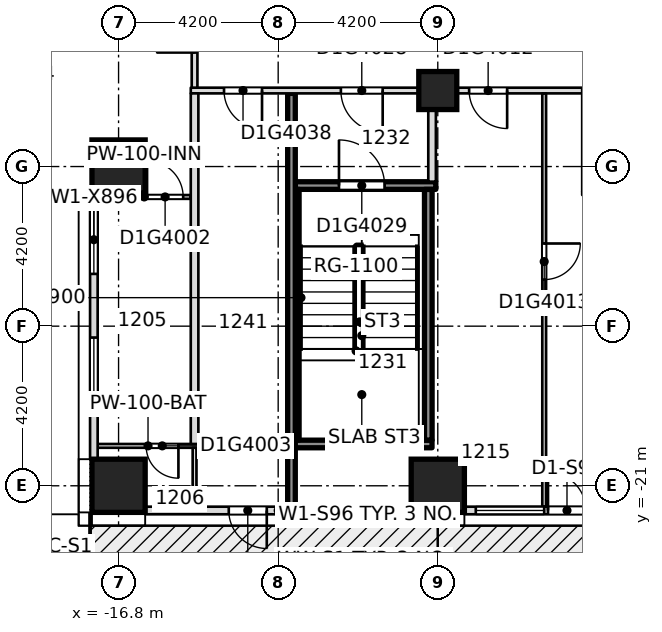
"""IFC4 building model, lengths in metres.
Left out: names, types, materials, properties, quantities, classifications, styles, units other than length and angle.
Written with IfcOpenShell. Run it as: python <this file> out.ifc"""

import sys

from ifc_helpers import new_model, si_unit, direction, frame, frame_2d, origin, origin_2d, place, context, subcontext, project, spatial, rectangle, extrude, element, fill, save


model = new_model("IFC4")
c1 = context("Model", 3, precision=1e-05, world=origin(), true_north=direction((0.0, 1.0)))
c2 = subcontext(c1, "Body", "Model", "MODEL_VIEW")
j1 = project(units=[si_unit("LENGTHUNIT", "METRE"), si_unit("PLANEANGLEUNIT", "RADIAN")], contexts=[c1])
p1 = place(None, origin())
s1 = spatial("IfcSite", under=j1, at=p1, CompositionType="ELEMENT")
p2 = place(p1, origin())
s2 = spatial("IfcBuilding", under=s1, at=p2, CompositionType="ELEMENT")
p3 = place(p2, frame((0.0, 0.0, 55.2)))
s3 = spatial("IfcBuildingStorey", under=s2, at=p3, CompositionType="ELEMENT", Elevation=55.2)
for number, where, z_axis, x_axis in (
    (1, (-16.8, -21.0, -0.32), (0.0, 0.0, 1.0), (1.0, 0.0, 0.0)),
    (2, (-8.4, -21.0, -0.32), (0.0, 0.0, 1.0), (1.0, 0.0, 0.0)),
    (3, (-16.8, -12.6, -0.32), (0.0, 0.0, 1.0), (1.0, 0.0, 0.0)),
):
    element("IfcColumn", number, at=place(p3, frame(where, z_axis=z_axis, x_axis=x_axis)), inside=s3, PredefinedType="COLUMN", context=c2, shape_type="SweptSolid", body=[
        extrude(rectangle(XDim=1.4, YDim=1.4, at=origin_2d()), origin(), (0.0, 0.0, 1.0), 3.45),
    ])
p4 = place(p3, frame((-8.4, -10.6, -0.32), z_axis=(0.0, 0.0, 1.0), x_axis=(1.0, 0.0, 0.0)))
e4 = element("IfcColumn", 4, at=p4, inside=s3, PredefinedType="COLUMN", context=c2, shape_type="SweptSolid", body=[
    extrude(rectangle(XDim=1.0, YDim=1.0, at=origin_2d()), origin(), (0.0, 0.0, 1.0), 3.45),
])
p5 = place(p3, frame((-17.35, -19.95, 0.0), z_axis=(0.0, 0.0, 1.0), x_axis=(1.0, 0.0, 0.0)))
e5 = element("IfcWall", 5, at=p5, inside=s3, PredefinedType="PARTITIONING", context=c2, shape_type="SweptSolid", body=[
    extrude(rectangle(XDim=2.65, YDim=0.1, at=frame_2d((1.325, 0.0))), origin(), (0.0, 0.0, 1.0), 3.13),
])
p6 = place(p5, frame((1.275, 0.0, 0.0)))
e6 = element("IfcOpeningElement", 6, at=p6, cuts=e5, PredefinedType="OPENING", context=c2, shape_type="SweptSolid", body=[
    extrude(rectangle(XDim=0.85, YDim=2.1, at=frame_2d((0.425, 1.05))), frame((0.0, 0.06, 0.0), z_axis=(0.0, -1.0, 0.0), x_axis=(1.0, 0.0, 0.0)), (0.0, 0.0, 1.0), 0.12),
])
p7 = place(p3, frame((-12.248, -19.9, 0.0), z_axis=(0.0, 0.0, 1.0), x_axis=(1.0, 0.0, 0.0)))
e7 = element("IfcWall", 7, at=p7, inside=s3, PredefinedType="SOLIDWALL", context=c2, shape_type="SweptSolid", body=[
    extrude(rectangle(XDim=3.696, YDim=0.2, at=frame_2d((1.848, 0.0))), origin(), (0.0, 0.0, 1.0), 3.13),
])
p8 = place(p3, frame((-17.35, -13.4, 0.0), z_axis=(0.0, 0.0, 1.0), x_axis=(1.0, 0.0, 0.0)))
e8 = element("IfcWall", 8, at=p8, inside=s3, PredefinedType="PARTITIONING", context=c2, shape_type="SweptSolid", body=[
    extrude(rectangle(XDim=2.45, YDim=0.1, at=frame_2d((1.225, 0.0))), origin(), (0.0, 0.0, 1.0), 3.13),
])
p9 = place(p8, frame((1.3, 0.0, 0.0)))
e9 = element("IfcOpeningElement", 9, at=p9, cuts=e8, PredefinedType="OPENING", context=c2, shape_type="SweptSolid", body=[
    extrude(rectangle(XDim=0.95, YDim=2.1, at=frame_2d((0.475, 1.05))), frame((0.0, 0.06, 0.0), z_axis=(0.0, -1.0, 0.0), x_axis=(1.0, 0.0, 0.0)), (0.0, 0.0, 1.0), 0.12),
])
p10 = place(p3, frame((-12.148, -13.1, 0.0), z_axis=(0.0, 0.0, 1.0), x_axis=(1.0, 0.0, 0.0)))
e10 = element("IfcWall", 10, at=p10, inside=s3, PredefinedType="SOLIDWALL", context=c2, shape_type="SweptSolid", body=[
    extrude(rectangle(XDim=3.696, YDim=0.2, at=frame_2d((1.848, 0.0))), origin(), (0.0, 0.0, 1.0), 3.13),
])
p11 = place(p10, frame((1.148, 0.0, 0.0)))
e11 = element("IfcOpeningElement", 11, at=p11, cuts=e10, PredefinedType="OPENING", context=c2, shape_type="SweptSolid", body=[
    extrude(rectangle(XDim=1.2, YDim=2.1, at=frame_2d((0.6, 1.05))), frame((0.0, 0.11, 0.0), z_axis=(0.0, -1.0, 0.0), x_axis=(1.0, 0.0, 0.0)), (0.0, 0.0, 1.0), 0.22),
])
p12 = place(p3, frame((-14.9, -10.6, 0.0), z_axis=(0.0, 0.0, 1.0), x_axis=(1.0, 0.0, 0.0)))
e12 = element("IfcWall", 12, at=p12, inside=s3, PredefinedType="PARTITIONING", context=c2, shape_type="SweptSolid", body=[
    extrude(rectangle(XDim=10.4, YDim=0.15, at=frame_2d((5.2, 0.0))), origin(), (0.0, 0.0, 1.0), 3.13),
])
p13 = place(p12, frame((7.325, 0.0, 0.0)))
e13 = element("IfcOpeningElement", 13, at=p13, cuts=e12, PredefinedType="OPENING", context=c2, shape_type="SweptSolid", body=[
    extrude(rectangle(XDim=1.0, YDim=2.1, at=frame_2d((0.5, 1.05))), frame((0.0, 0.085, 0.0), z_axis=(0.0, -1.0, 0.0), x_axis=(1.0, 0.0, 0.0)), (0.0, 0.0, 1.0), 0.17),
])
p14 = place(p12, frame((3.95, 0.0, 0.0)))
e14 = element("IfcOpeningElement", 14, at=p14, cuts=e12, PredefinedType="OPENING", context=c2, shape_type="SweptSolid", body=[
    extrude(rectangle(XDim=1.1, YDim=2.1, at=frame_2d((0.55, 1.05))), frame((0.0, 0.085, 0.0), z_axis=(0.0, -1.0, 0.0), x_axis=(1.0, 0.0, 0.0)), (0.0, 0.0, 1.0), 0.17),
])
p15 = place(p12, frame((0.875, 0.0, 0.0)))
e15 = element("IfcOpeningElement", 15, at=p15, cuts=e12, PredefinedType="OPENING", context=c2, shape_type="SweptSolid", body=[
    extrude(rectangle(XDim=1.0, YDim=2.1, at=frame_2d((0.5, 1.05))), frame((0.0, 0.085, 0.0), z_axis=(0.0, -1.0, 0.0), x_axis=(1.0, 0.0, 0.0)), (0.0, 0.0, 1.0), 0.17),
])
p16 = place(p3, frame((-4.6, -10.6, 0.0), z_axis=(0.0, 0.0, 1.0), x_axis=(1.0, 0.0, 0.0)))
e16 = element("IfcWall", 16, at=p16, inside=s3, PredefinedType="PARTITIONING", context=c2, shape_type="SweptSolid", body=[
    extrude(rectangle(XDim=2.8, YDim=0.1, at=frame_2d((1.4, 0.0))), origin(), (0.0, 0.0, 1.0), 3.13),
])
p17 = place(p3, frame((-14.8, -21.55, 0.0), z_axis=(0.0, 0.0, 1.0), x_axis=(0.0, 1.0, 0.0)))
e17 = element("IfcWall", 17, at=p17, inside=s3, PredefinedType="PARTITIONING", context=c2, shape_type="SweptSolid", body=[
    extrude(rectangle(XDim=1.55, YDim=0.1, at=frame_2d((0.775, 0.0))), origin(), (0.0, 0.0, 1.0), 3.13),
])
p18 = place(p3, frame((-14.8, -19.9, 0.0), z_axis=(0.0, 0.0, 1.0), x_axis=(0.0, 1.0, 0.0)))
e18 = element("IfcWall", 18, at=p18, inside=s3, PredefinedType="PARTITIONING", context=c2, shape_type="SweptSolid", body=[
    extrude(rectangle(XDim=9.225, YDim=0.2, at=frame_2d((4.612, 0.0))), origin(), (0.0, 0.0, 1.0), 3.13),
])
p19 = place(p3, frame((-14.8, -10.525, 0.0), z_axis=(0.0, 0.0, 1.0), x_axis=(0.0, 1.0, 0.0)))
e19 = element("IfcWall", 19, at=p19, inside=s3, PredefinedType="PARTITIONING", context=c2, shape_type="SweptSolid", body=[
    extrude(rectangle(XDim=18.535, YDim=0.15, at=frame_2d((9.268, 0.0))), origin(), (0.0, 0.0, 1.0), 3.13),
])
p20 = place(p19, frame((0.925, 0.0, 0.0)))
e20 = element("IfcOpeningElement", 20, at=p20, cuts=e19, PredefinedType="OPENING", context=c2, shape_type="SweptSolid", body=[
    extrude(rectangle(XDim=1.0, YDim=2.1, at=frame_2d((0.5, 1.05))), frame((0.0, 0.085, 0.0), z_axis=(0.0, -1.0, 0.0), x_axis=(1.0, 0.0, 0.0)), (0.0, 0.0, 1.0), 0.17),
])
p21 = place(p19, frame((15.755, 0.0, 0.0)))
e21 = element("IfcOpeningElement", 21, at=p21, cuts=e19, PredefinedType="OPENING", context=c2, shape_type="SweptSolid", body=[
    extrude(rectangle(XDim=1.0, YDim=2.1, at=frame_2d((0.5, 1.05))), frame((0.0, 0.085, 0.0), z_axis=(0.0, -1.0, 0.0), x_axis=(1.0, 0.0, 0.0)), (0.0, 0.0, 1.0), 0.17),
])
p22 = place(p19, frame((9.975, 0.0, 0.0)))
e22 = element("IfcOpeningElement", 22, at=p22, cuts=e19, PredefinedType="OPENING", context=c2, shape_type="SweptSolid", body=[
    extrude(rectangle(XDim=1.1, YDim=2.1, at=frame_2d((0.55, 1.05))), frame((0.0, 0.085, 0.0), z_axis=(0.0, -1.0, 0.0), x_axis=(1.0, 0.0, 0.0)), (0.0, 0.0, 1.0), 0.17),
])
p23 = place(p19, frame((4.725, 0.0, 0.0)))
e23 = element("IfcOpeningElement", 23, at=p23, cuts=e19, PredefinedType="OPENING", context=c2, shape_type="SweptSolid", body=[
    extrude(rectangle(XDim=1.0, YDim=2.1, at=frame_2d((0.5, 1.05))), frame((0.0, 0.085, 0.0), z_axis=(0.0, -1.0, 0.0), x_axis=(1.0, 0.0, 0.0)), (0.0, 0.0, 1.0), 0.17),
])
for number, where, z_axis, x_axis in (
    (24, (-12.15, -19.798, 0.0), (0.0, 0.0, 1.0), (0.0, 1.0, 0.0)),
    (25, (-8.65, -19.798, 0.0), (0.0, 0.0, 1.0), (0.0, 1.0, 0.0)),
):
    element("IfcWall", number, at=place(p3, frame(where, z_axis=z_axis, x_axis=x_axis)), inside=s3, PredefinedType="SOLIDWALL", context=c2, shape_type="SweptSolid", body=[
        extrude(rectangle(XDim=6.596, YDim=0.2, at=frame_2d((3.298, 0.0))), origin(), (0.0, 0.0, 1.0), 3.13),
    ])
p24 = place(p3, frame((-8.55, -12.998, 0.0), z_axis=(0.0, 0.0, 1.0), x_axis=(0.0, 1.0, 0.0)))
e26 = element("IfcWall", 26, at=p24, inside=s3, PredefinedType="PARTITIONING", context=c2, shape_type="SweptSolid", body=[
    extrude(rectangle(XDim=2.323, YDim=0.2, at=frame_2d((1.162, 0.0))), origin(), (0.0, 0.0, 1.0), 3.13),
])
p25 = place(p3, frame((-5.6, -21.55, 0.0), z_axis=(0.0, 0.0, 1.0), x_axis=(0.0, 1.0, 0.0)))
e27 = element("IfcWall", 27, at=p25, inside=s3, PredefinedType="PARTITIONING", context=c2, shape_type="SweptSolid", body=[
    extrude(rectangle(XDim=10.875, YDim=0.1, at=frame_2d((5.438, 0.0))), origin(), (0.0, 0.0, 1.0), 3.13),
])
p26 = place(p25, frame((5.975, 0.0, 0.0)))
e28 = element("IfcOpeningElement", 28, at=p26, cuts=e27, PredefinedType="OPENING", context=c2, shape_type="SweptSolid", body=[
    extrude(rectangle(XDim=0.95, YDim=2.1, at=frame_2d((0.475, 1.05))), frame((0.0, 0.06, 0.0), z_axis=(0.0, -1.0, 0.0), x_axis=(1.0, 0.0, 0.0)), (0.0, 0.0, 1.0), 0.12),
])
p27 = place(p3, frame((-16.1, -21.65, 0.0), z_axis=(0.0, 0.0, 1.0), x_axis=(1.0, 0.0, 0.0)))
e29 = element("IfcWall", 29, at=p27, inside=s3, PredefinedType="STANDARD", context=c2, shape_type="SweptSolid", body=[
    extrude(rectangle(XDim=7.0, YDim=0.2, at=frame_2d((3.5, 0.0))), origin(), (0.0, 0.0, 1.0), 3.13),
])
p28 = place(p27, frame((4.07, 0.0, 0.2)))
e30 = element("IfcOpeningElement", 30, at=p28, cuts=e29, PredefinedType="OPENING", context=c2, shape_type="SweptSolid", body=[
    extrude(rectangle(XDim=1.8, YDim=2.65, at=frame_2d((0.9, 1.325))), frame((0.0, 0.11, 0.0), z_axis=(0.0, -1.0, 0.0), x_axis=(1.0, 0.0, 0.0)), (0.0, 0.0, 1.0), 0.22),
])
p29 = place(p27, frame((2.2, 0.0, 0.0)))
e31 = element("IfcOpeningElement", 31, at=p29, cuts=e29, PredefinedType="OPENING", context=c2, shape_type="SweptSolid", body=[
    extrude(rectangle(XDim=1.0, YDim=2.4, at=frame_2d((0.5, 1.2))), frame((0.0, 0.11, 0.0), z_axis=(0.0, -1.0, 0.0), x_axis=(1.0, 0.0, 0.0)), (0.0, 0.0, 1.0), 0.22),
])
p30 = place(p3, frame((-7.7, -21.65, 0.0), z_axis=(0.0, 0.0, 1.0), x_axis=(1.0, 0.0, 0.0)))
e32 = element("IfcWall", 32, at=p30, inside=s3, PredefinedType="STANDARD", context=c2, shape_type="SweptSolid", body=[
    extrude(rectangle(XDim=7.0, YDim=0.2, at=frame_2d((3.5, 0.0))), origin(), (0.0, 0.0, 1.0), 3.13),
])
p31 = place(p30, frame((0.3, 0.0, 0.2)))
e33 = element("IfcOpeningElement", 33, at=p31, cuts=e32, PredefinedType="OPENING", context=c2, shape_type="SweptSolid", body=[
    extrude(rectangle(XDim=1.8, YDim=2.65, at=frame_2d((0.9, 1.325))), frame((0.0, 0.11, 0.0), z_axis=(0.0, -1.0, 0.0), x_axis=(1.0, 0.0, 0.0)), (0.0, 0.0, 1.0), 0.22),
])
p32 = place(p30, frame((2.2, 0.0, 0.0)))
e34 = element("IfcOpeningElement", 34, at=p32, cuts=e32, PredefinedType="OPENING", context=c2, shape_type="SweptSolid", body=[
    extrude(rectangle(XDim=1.0, YDim=2.4, at=frame_2d((0.5, 1.2))), frame((0.0, 0.11, 0.0), z_axis=(0.0, -1.0, 0.0), x_axis=(1.0, 0.0, 0.0)), (0.0, 0.0, 1.0), 0.22),
])
p33 = place(p3, frame((-24.5, -13.25, 0.0), z_axis=(0.0, 0.0, 1.0), x_axis=(1.0, 0.0, 0.0)))
e35 = element("IfcWall", 35, at=p33, inside=s3, PredefinedType="STANDARD", context=c2, shape_type="SweptSolid", body=[
    extrude(rectangle(XDim=6.95, YDim=0.2, at=frame_2d((3.475, 0.0))), origin(), (0.0, 0.0, 1.0), 3.13),
])
p34 = place(p3, frame((-17.45, -13.35, 0.0), z_axis=(0.0, 0.0, 1.0), x_axis=(0.0, -1.0, 0.0)))
e36 = element("IfcWall", 36, at=p34, inside=s3, PredefinedType="STANDARD", context=c2, shape_type="SweptSolid", body=[
    extrude(rectangle(XDim=6.95, YDim=0.2, at=frame_2d((3.475, 0.0))), origin(), (0.0, 0.0, 1.0), 3.13),
])
p35 = place(p34, frame((3.75, 0.0, 0.2)))
e37 = element("IfcOpeningElement", 37, at=p35, cuts=e36, PredefinedType="OPENING", context=c2, shape_type="SweptSolid", body=[
    extrude(rectangle(XDim=1.8, YDim=2.65, at=frame_2d((0.9, 1.325))), frame((0.0, 0.11, 0.0), z_axis=(0.0, -1.0, 0.0), x_axis=(1.0, 0.0, 0.0)), (0.0, 0.0, 1.0), 0.22),
])
p36 = place(p34, frame((0.275, 0.0, 0.2)))
e38 = element("IfcOpeningElement", 38, at=p36, cuts=e36, PredefinedType="OPENING", context=c2, shape_type="SweptSolid", body=[
    extrude(rectangle(XDim=1.8, YDim=2.65, at=frame_2d((0.9, 1.325))), frame((0.0, 0.11, 0.0), z_axis=(0.0, -1.0, 0.0), x_axis=(1.0, 0.0, 0.0)), (0.0, 0.0, 1.0), 0.22),
])
p37 = place(p3, frame((-12.25, -21.55, 0.0), z_axis=(0.0, 0.0, 1.0), x_axis=(0.0, 1.0, 0.0)))
e39 = element("IfcWall", 39, at=p37, inside=s3, PredefinedType="SOLIDWALL", context=c2, shape_type="SweptSolid", body=[
    extrude(rectangle(XDim=10.875, YDim=0.2, at=frame_2d((5.438, 0.0))), origin(), (0.0, 0.0, 1.0), 3.13),
])
p38 = place(p9, origin())
e40 = element("IfcDoor", 40, at=p38, inside=s3, OperationType="SINGLE_SWING_RIGHT", PredefinedType="DOOR", context=c2, shape_type="SweptSolid", body=[
    extrude(rectangle(XDim=0.95, YDim=2.1, at=frame_2d((0.475, 1.05))), frame((0.0, 0.025, 0.0), z_axis=(0.0, -1.0, 0.0), x_axis=(1.0, 0.0, 0.0)), (0.0, 0.0, 1.0), 0.05),
])
fill(e9, e40)
p39 = place(p6, origin())
e41 = element("IfcDoor", 41, at=p39, inside=s3, OperationType="SINGLE_SWING_RIGHT", PredefinedType="DOOR", context=c2, shape_type="SweptSolid", body=[
    extrude(rectangle(XDim=0.85, YDim=2.1, at=frame_2d((0.425, 1.05))), frame((0.0, 0.025, 0.0), z_axis=(0.0, -1.0, 0.0), x_axis=(1.0, 0.0, 0.0)), (0.0, 0.0, 1.0), 0.05),
])
fill(e6, e41)
p40 = place(p13, origin())
e42 = element("IfcDoor", 42, at=p40, inside=s3, OperationType="SINGLE_SWING_RIGHT", PredefinedType="DOOR", context=c2, shape_type="SweptSolid", body=[
    extrude(rectangle(XDim=1.0, YDim=2.1, at=frame_2d((0.5, 1.05))), frame((0.0, 0.025, 0.0), z_axis=(0.0, -1.0, 0.0), x_axis=(1.0, 0.0, 0.0)), (0.0, 0.0, 1.0), 0.05),
])
fill(e13, e42)
p41 = place(p26, origin())
e43 = element("IfcDoor", 43, at=p41, inside=s3, OperationType="SINGLE_SWING_LEFT", PredefinedType="DOOR", context=c2, shape_type="SweptSolid", body=[
    extrude(rectangle(XDim=0.95, YDim=2.1, at=frame_2d((0.475, 1.05))), frame((0.0, 0.025, 0.0), z_axis=(0.0, -1.0, 0.0), x_axis=(1.0, 0.0, 0.0)), (0.0, 0.0, 1.0), 0.05),
])
fill(e28, e43)
p42 = place(p14, origin())
e44 = element("IfcDoor", 44, at=p42, inside=s3, OperationType="SINGLE_SWING_RIGHT", PredefinedType="DOOR", context=c2, shape_type="SweptSolid", body=[
    extrude(rectangle(XDim=1.1, YDim=2.1, at=frame_2d((0.55, 1.05))), frame((0.0, 0.025, 0.0), z_axis=(0.0, -1.0, 0.0), x_axis=(1.0, 0.0, 0.0)), (0.0, 0.0, 1.0), 0.05),
])
fill(e14, e44)
p43 = place(p11, origin())
e45 = element("IfcDoor", 45, at=p43, inside=s3, OperationType="SINGLE_SWING_RIGHT", PredefinedType="DOOR", context=c2, shape_type="SweptSolid", body=[
    extrude(rectangle(XDim=1.2, YDim=2.1, at=frame_2d((0.6, 1.05))), frame((0.0, 0.025, 0.0), z_axis=(0.0, -1.0, 0.0), x_axis=(1.0, 0.0, 0.0)), (0.0, 0.0, 1.0), 0.05),
])
fill(e11, e45)
p44 = place(p15, origin())
e46 = element("IfcDoor", 46, at=p44, inside=s3, OperationType="SINGLE_SWING_RIGHT", PredefinedType="DOOR", context=c2, shape_type="SweptSolid", body=[
    extrude(rectangle(XDim=1.0, YDim=2.1, at=frame_2d((0.5, 1.05))), frame((0.0, 0.025, 0.0), z_axis=(0.0, -1.0, 0.0), x_axis=(1.0, 0.0, 0.0)), (0.0, 0.0, 1.0), 0.05),
])
fill(e15, e46)
p45 = place(p28, origin())
e47 = element("IfcWindow", 47, at=p45, inside=s3, PartitioningType="SINGLE_PANEL", PredefinedType="WINDOW", context=c2, shape_type="SweptSolid", body=[
    extrude(rectangle(XDim=1.8, YDim=2.65, at=frame_2d((0.9, 1.325))), frame((0.0, 0.03, 0.0), z_axis=(0.0, -1.0, 0.0), x_axis=(1.0, 0.0, 0.0)), (0.0, 0.0, 1.0), 0.06),
])
fill(e30, e47)
p46 = place(p29, origin())
e48 = element("IfcDoor", 48, at=p46, inside=s3, OperationType="SINGLE_SWING_LEFT", PredefinedType="DOOR", context=c2, shape_type="SweptSolid", body=[
    extrude(rectangle(XDim=1.0, YDim=2.4, at=frame_2d((0.5, 1.2))), frame((0.0, 0.025, 0.0), z_axis=(0.0, -1.0, 0.0), x_axis=(1.0, 0.0, 0.0)), (0.0, 0.0, 1.0), 0.05),
])
fill(e31, e48)
p47 = place(p31, origin())
e49 = element("IfcWindow", 49, at=p47, inside=s3, PartitioningType="SINGLE_PANEL", PredefinedType="WINDOW", context=c2, shape_type="SweptSolid", body=[
    extrude(rectangle(XDim=1.8, YDim=2.65, at=frame_2d((0.9, 1.325))), frame((0.0, 0.03, 0.0), z_axis=(0.0, -1.0, 0.0), x_axis=(1.0, 0.0, 0.0)), (0.0, 0.0, 1.0), 0.06),
])
fill(e33, e49)
p48 = place(p32, origin())
e50 = element("IfcDoor", 50, at=p48, inside=s3, OperationType="SINGLE_SWING_LEFT", PredefinedType="DOOR", context=c2, shape_type="SweptSolid", body=[
    extrude(rectangle(XDim=1.0, YDim=2.4, at=frame_2d((0.5, 1.2))), frame((0.0, 0.025, 0.0), z_axis=(0.0, -1.0, 0.0), x_axis=(1.0, 0.0, 0.0)), (0.0, 0.0, 1.0), 0.05),
])
fill(e34, e50)
p49 = place(p35, origin())
e51 = element("IfcWindow", 51, at=p49, inside=s3, PartitioningType="SINGLE_PANEL", PredefinedType="WINDOW", context=c2, shape_type="SweptSolid", body=[
    extrude(rectangle(XDim=1.8, YDim=2.65, at=frame_2d((0.9, 1.325))), frame((0.0, 0.03, 0.0), z_axis=(0.0, -1.0, 0.0), x_axis=(1.0, 0.0, 0.0)), (0.0, 0.0, 1.0), 0.06),
])
fill(e37, e51)
p50 = place(p36, origin())
e52 = element("IfcWindow", 52, at=p50, inside=s3, PartitioningType="SINGLE_PANEL", PredefinedType="WINDOW", context=c2, shape_type="SweptSolid", body=[
    extrude(rectangle(XDim=1.8, YDim=2.65, at=frame_2d((0.9, 1.325))), frame((0.0, 0.03, 0.0), z_axis=(0.0, -1.0, 0.0), x_axis=(1.0, 0.0, 0.0)), (0.0, 0.0, 1.0), 0.06),
])
fill(e38, e52)
save(model, sys.argv[1])
